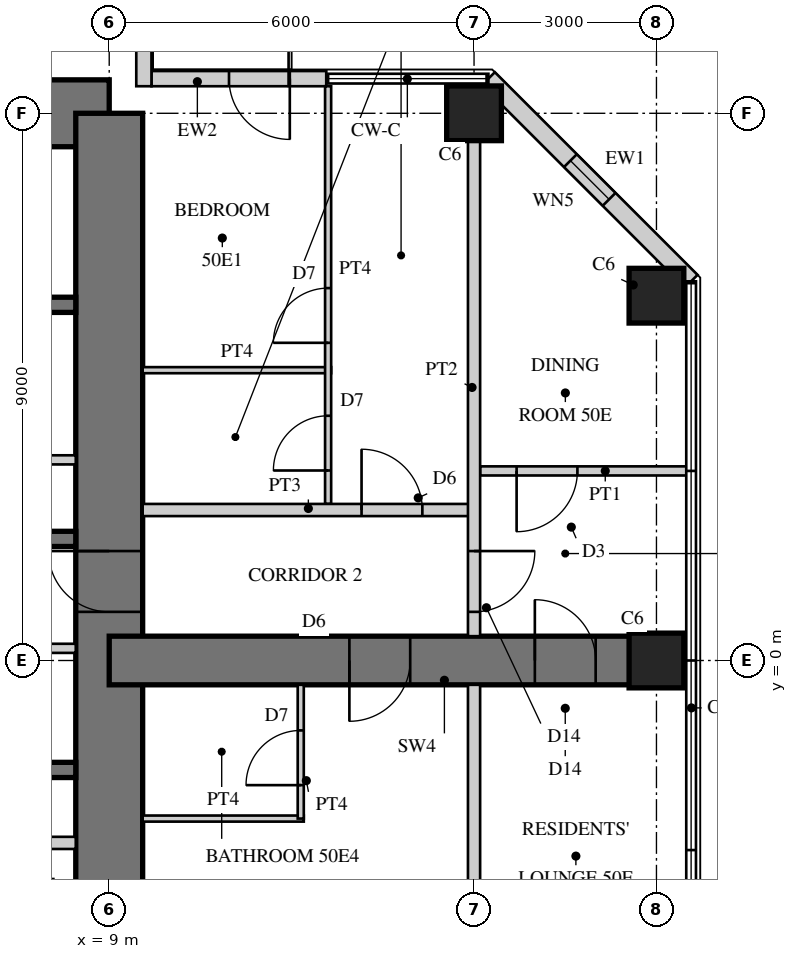
"""IFC4 building model, lengths in metres.
Left out: names, types, materials, properties, quantities, classifications, styles, units other than length and angle.
Written with IfcOpenShell. Run it as: python <this file> out.ifc"""

import sys

from ifc_helpers import new_model, si_unit, direction, frame, frame_2d, origin, origin_2d, place, context, subcontext, project, spatial, rectangle, hollow_rectangle, extrude, element, fill, save


model = new_model("IFC4")
c1 = context("Model", 3, precision=1e-05, world=origin(), true_north=direction((0.0, 1.0)))
c2 = subcontext(c1, "Body", "Model", "MODEL_VIEW")
j1 = project(units=[si_unit("LENGTHUNIT", "METRE"), si_unit("PLANEANGLEUNIT", "RADIAN")], contexts=[c1])
p1 = place(None, origin())
s1 = spatial("IfcSite", under=j1, at=p1, CompositionType="ELEMENT")
p2 = place(p1, origin())
s2 = spatial("IfcBuilding", under=s1, at=p2, CompositionType="ELEMENT")
p3 = place(p2, frame((0.0, 0.0, 200.1)))
s3 = spatial("IfcBuildingStorey", under=s2, at=p3, CompositionType="ELEMENT", Elevation=200.1)
p4 = place(p3, frame((9.0, 9.0, 0.0), z_axis=(0.0, 0.0, 1.0), x_axis=(-1.0, 0.0, 0.0)))
e1 = element("IfcWall", 1, at=p4, inside=s3, PredefinedType="SHEAR", context=c2, shape_type="SweptSolid", body=[
    extrude(rectangle(XDim=18.0, YDim=1.1, at=frame_2d((9.0, 0.0))), origin(), (0.0, 0.0, 1.0), 3.4),
])
p5 = place(p4, frame((9.8, 0.0, 0.0)))
e2 = element("IfcOpeningElement", 2, at=p5, cuts=e1, PredefinedType="OPENING", context=c2, shape_type="SweptSolid", body=[
    extrude(rectangle(XDim=1.0, YDim=2.4, at=frame_2d((0.5, 1.2))), frame((0.0, 0.56, 0.0), z_axis=(0.0, -1.0, 0.0), x_axis=(1.0, 0.0, 0.0)), (0.0, 0.0, 1.0), 1.12),
])
p6 = place(p3, frame((9.0, -9.0, 0.0), z_axis=(0.0, 0.0, 1.0), x_axis=(0.0, 1.0, 0.0)))
e3 = element("IfcWall", 3, at=p6, inside=s3, PredefinedType="SHEAR", context=c2, shape_type="SweptSolid", body=[
    extrude(rectangle(XDim=18.0, YDim=1.1, at=frame_2d((9.0, 0.0))), origin(), (0.0, 0.0, 1.0), 3.4),
])
p7 = place(p6, frame((9.8, 0.0, 0.0)))
e4 = element("IfcOpeningElement", 4, at=p7, cuts=e3, PredefinedType="OPENING", context=c2, shape_type="SweptSolid", body=[
    extrude(rectangle(XDim=1.0, YDim=2.4, at=frame_2d((0.5, 1.2))), frame((0.0, 0.56, 0.0), z_axis=(0.0, -1.0, 0.0), x_axis=(1.0, 0.0, 0.0)), (0.0, 0.0, 1.0), 1.12),
])
p8 = place(p3, frame((1.925, 2.0, 0.0), z_axis=(0.0, 0.0, 1.0), x_axis=(1.0, 0.0, 0.0)))
e5 = element("IfcWall", 5, at=p8, inside=s3, PredefinedType="SHEAR", context=c2, shape_type="SweptSolid", body=[
    extrude(rectangle(XDim=6.525, YDim=0.25, at=frame_2d((3.262, 0.0))), origin(), (0.0, 0.0, 1.0), 3.4),
])
p9 = place(p3, frame((1.925, 5.85, 0.0), z_axis=(0.0, 0.0, 1.0), x_axis=(1.0, 0.0, 0.0)))
e6 = element("IfcWall", 6, at=p9, inside=s3, PredefinedType="SHEAR", context=c2, shape_type="SweptSolid", body=[
    extrude(rectangle(XDim=6.525, YDim=0.25, at=frame_2d((3.262, 0.0))), origin(), (0.0, 0.0, 1.0), 3.4),
])
p10 = place(p9, frame((0.521, 0.0, 0.0)))
e7 = element("IfcOpeningElement", 7, at=p10, cuts=e6, PredefinedType="OPENING", context=c2, shape_type="SweptSolid", body=[
    extrude(rectangle(XDim=1.0, YDim=2.1, at=frame_2d((0.5, 1.05))), frame((0.0, 0.135, 0.0), z_axis=(0.0, -1.0, 0.0), x_axis=(1.0, 0.0, 0.0)), (0.0, 0.0, 1.0), 0.27),
])
p11 = place(p9, frame((2.762, 0.0, 0.0)))
e8 = element("IfcOpeningElement", 8, at=p11, cuts=e6, PredefinedType="OPENING", context=c2, shape_type="SweptSolid", body=[
    extrude(rectangle(XDim=1.0, YDim=2.1, at=frame_2d((0.5, 1.05))), frame((0.0, 0.135, 0.0), z_axis=(0.0, -1.0, 0.0), x_axis=(1.0, 0.0, 0.0)), (0.0, 0.0, 1.0), 0.27),
])
p12 = place(p3, frame((1.925, 3.3, 0.0), z_axis=(0.0, 0.0, 1.0), x_axis=(1.0, 0.0, 0.0)))
e9 = element("IfcWall", 9, at=p12, inside=s3, PredefinedType="PARTITIONING", context=c2, shape_type="SweptSolid", body=[
    extrude(rectangle(XDim=6.525, YDim=0.15, at=frame_2d((3.262, 0.0))), origin(), (0.0, 0.0, 1.0), 3.4),
])
p13 = place(p12, frame((0.075, 0.0, 0.0)))
e10 = element("IfcOpeningElement", 10, at=p13, cuts=e9, PredefinedType="OPENING", context=c2, shape_type="SweptSolid", body=[
    extrude(rectangle(XDim=0.8, YDim=2.1, at=frame_2d((0.4, 1.05))), frame((0.0, 0.085, 0.0), z_axis=(0.0, -1.0, 0.0), x_axis=(1.0, 0.0, 0.0)), (0.0, 0.0, 1.0), 0.17),
])
p14 = place(p12, frame((3.675, 0.0, 0.0)))
e11 = element("IfcOpeningElement", 11, at=p14, cuts=e9, PredefinedType="OPENING", context=c2, shape_type="SweptSolid", body=[
    extrude(rectangle(XDim=0.8, YDim=2.1, at=frame_2d((0.4, 1.05))), frame((0.0, 0.085, 0.0), z_axis=(0.0, -1.0, 0.0), x_axis=(1.0, 0.0, 0.0)), (0.0, 0.0, 1.0), 0.17),
])
p15 = place(p3, frame((2.125, -1.8, 0.0), z_axis=(0.0, 0.0, 1.0), x_axis=(1.0, 0.0, 0.0)))
e12 = element("IfcWall", 12, at=p15, inside=s3, PredefinedType="SHEAR", context=c2, shape_type="SweptSolid", body=[
    extrude(rectangle(XDim=6.325, YDim=0.25, at=frame_2d((3.163, 0.0))), origin(), (0.0, 0.0, 1.0), 3.4),
])
p16 = place(p3, frame((5.725, -3.0, 0.0), z_axis=(0.0, 0.0, 1.0), x_axis=(1.0, 0.0, 0.0)))
e13 = element("IfcWall", 13, at=p16, inside=s3, PredefinedType="PARTITIONING", context=c2, shape_type="SweptSolid", body=[
    extrude(rectangle(XDim=2.725, YDim=0.2, at=frame_2d((1.362, 0.0))), origin(), (0.0, 0.0, 1.0), 3.4),
])
p17 = place(p3, frame((9.0, 0.0, 0.0), z_axis=(0.0, 0.0, 1.0), x_axis=(1.0, 0.0, 0.0)))
e14 = element("IfcWall", 14, at=p17, inside=s3, PredefinedType="SHEAR", context=c2, shape_type="SweptSolid", body=[
    extrude(rectangle(XDim=9.0, YDim=0.8, at=frame_2d((4.5, 0.0))), origin(), (0.0, 0.0, 1.0), 3.4),
])
p18 = place(p17, frame((3.95, 0.0, 0.0)))
e15 = element("IfcOpeningElement", 15, at=p18, cuts=e14, PredefinedType="OPENING", context=c2, shape_type="SweptSolid", body=[
    extrude(rectangle(XDim=1.0, YDim=2.15, at=frame_2d((0.5, 1.075))), frame((0.0, 0.41, 0.0), z_axis=(0.0, -1.0, 0.0), x_axis=(1.0, 0.0, 0.0)), (0.0, 0.0, 1.0), 0.82),
])
p19 = place(p17, frame((7.0, 0.0, 0.0)))
e16 = element("IfcOpeningElement", 16, at=p19, cuts=e14, PredefinedType="OPENING", context=c2, shape_type="SweptSolid", body=[
    extrude(rectangle(XDim=1.0, YDim=2.2, at=frame_2d((0.5, 1.1))), frame((0.0, 0.41, 0.0), z_axis=(0.0, -1.0, 0.0), x_axis=(1.0, 0.0, 0.0)), (0.0, 0.0, 1.0), 0.82),
])
for number, where, z_axis, x_axis in (
    (17, (15.0, 9.0, 0.0), (0.0, 0.0, 1.0), (1.0, 0.0, 0.0)),
    (18, (18.0, 0.0, 0.0), (0.0, 0.0, 1.0), (1.0, 0.0, 0.0)),
    (19, (18.0, 6.0, 0.0), (0.0, 0.0, 1.0), (1.0, 0.0, 0.0)),
):
    element("IfcColumn", number, at=place(p3, frame(where, z_axis=z_axis, x_axis=x_axis)), inside=s3, PredefinedType="COLUMN", context=c2, shape_type="SweptSolid", body=[
        extrude(rectangle(XDim=0.9, YDim=0.9, at=origin_2d()), origin(), (0.0, 0.0, 1.0), 3.4),
    ])
p20 = place(p3, frame((18.57, 6.236, 0.0), z_axis=(0.0, 0.0, 1.0), x_axis=(-0.707106781187, 0.707106781187, 0.0)))
e20 = element("IfcWall", 20, at=p20, inside=s3, PredefinedType="SOLIDWALL", context=c2, shape_type="SweptSolid", body=[
    extrude(rectangle(XDim=4.715, YDim=0.3, at=frame_2d((2.357, 0.0))), origin(), (0.0, 0.0, 1.0), 3.22),
])
p21 = place(p20, frame((1.907, 0.0, 0.3)))
e21 = element("IfcOpeningElement", 21, at=p21, cuts=e20, PredefinedType="OPENING", context=c2, shape_type="SweptSolid", body=[
    extrude(rectangle(XDim=0.9, YDim=2.4, at=frame_2d((0.45, 1.2))), frame((0.0, 0.16, 0.0), z_axis=(0.0, -1.0, 0.0), x_axis=(1.0, 0.0, 0.0)), (0.0, 0.0, 1.0), 0.32),
])
p22 = place(p3, frame((12.57, 9.57, 0.0), z_axis=(0.0, 0.0, 1.0), x_axis=(-1.0, 0.0, 0.0)))
e22 = element("IfcWall", 22, at=p22, inside=s3, PredefinedType="SOLIDWALL", context=c2, shape_type="SweptSolid", body=[
    extrude(rectangle(XDim=2.875, YDim=0.25, at=frame_2d((1.438, 0.0))), origin(), (0.0, 0.0, 1.0), 3.22),
])
p23 = place(p22, frame((0.6, 0.0, 0.0)))
e23 = element("IfcOpeningElement", 23, at=p23, cuts=e22, PredefinedType="OPENING", context=c2, shape_type="SweptSolid", body=[
    extrude(rectangle(XDim=1.0, YDim=2.2, at=frame_2d((0.5, 1.1))), frame((0.0, 0.135, 0.0), z_axis=(0.0, -1.0, 0.0), x_axis=(1.0, 0.0, 0.0)), (0.0, 0.0, 1.0), 0.27),
])
p24 = place(p3, frame((9.57, 9.445, 0.0), z_axis=(0.0, 0.0, 1.0), x_axis=(0.0, 1.0, 0.0)))
e24 = element("IfcWall", 24, at=p24, inside=s3, PredefinedType="SOLIDWALL", context=c2, shape_type="SweptSolid", body=[
    extrude(rectangle(XDim=3.125, YDim=0.25, at=frame_2d((1.562, 0.0))), origin(), (0.0, 0.0, 1.0), 3.22),
])
p25 = place(p24, frame((0.6, 0.0, 0.0)))
e25 = element("IfcOpeningElement", 25, at=p25, cuts=e24, PredefinedType="OPENING", context=c2, shape_type="SweptSolid", body=[
    extrude(rectangle(XDim=1.0, YDim=2.2, at=frame_2d((0.5, 1.1))), frame((0.0, 0.135, 0.0), z_axis=(0.0, -1.0, 0.0), x_axis=(1.0, 0.0, 0.0)), (0.0, 0.0, 1.0), 0.27),
])
p26 = place(p3, frame((2.325, 0.2, 0.0), z_axis=(0.0, 0.0, 1.0), x_axis=(1.0, 0.0, 0.0)))
e26 = element("IfcWall", 26, at=p26, inside=s3, PredefinedType="PARTITIONING", context=c2, shape_type="SweptSolid", body=[
    extrude(rectangle(XDim=6.125, YDim=0.15, at=frame_2d((3.062, 0.0))), origin(), (0.0, 0.0, 1.0), 3.22),
])
p27 = place(p26, frame((0.4, 0.0, 0.0)))
e27 = element("IfcOpeningElement", 27, at=p27, cuts=e26, PredefinedType="OPENING", context=c2, shape_type="SweptSolid", body=[
    extrude(rectangle(XDim=1.0, YDim=2.1, at=frame_2d((0.5, 1.05))), frame((0.0, 0.085, 0.0), z_axis=(0.0, -1.0, 0.0), x_axis=(1.0, 0.0, 0.0)), (0.0, 0.0, 1.0), 0.17),
])
p28 = place(p3, frame((9.55, 4.775, 0.0), z_axis=(0.0, 0.0, 1.0), x_axis=(1.0, 0.0, 0.0)))
e28 = element("IfcWall", 28, at=p28, inside=s3, PredefinedType="PARTITIONING", context=c2, shape_type="SweptSolid", body=[
    extrude(rectangle(XDim=3.1, YDim=0.1, at=frame_2d((1.55, 0.0))), origin(), (0.0, 0.0, 1.0), 3.22),
])
p29 = place(p3, frame((12.6, 2.575, 0.0), z_axis=(0.0, 0.0, 1.0), x_axis=(0.0, 1.0, 0.0)))
e29 = element("IfcWall", 29, at=p29, inside=s3, PredefinedType="PARTITIONING", context=c2, shape_type="SweptSolid", body=[
    extrude(rectangle(XDim=6.87, YDim=0.1, at=frame_2d((3.435, 0.0))), origin(), (0.0, 0.0, 1.0), 3.22),
])
p30 = place(p29, frame((0.55, 0.0, 0.0)))
e30 = element("IfcOpeningElement", 30, at=p30, cuts=e29, PredefinedType="OPENING", context=c2, shape_type="SweptSolid", body=[
    extrude(rectangle(XDim=0.9, YDim=2.1, at=frame_2d((0.45, 1.05))), frame((0.0, 0.06, 0.0), z_axis=(0.0, -1.0, 0.0), x_axis=(1.0, 0.0, 0.0)), (0.0, 0.0, 1.0), 0.12),
])
p31 = place(p29, frame((2.65, 0.0, 0.0)))
e31 = element("IfcOpeningElement", 31, at=p31, cuts=e29, PredefinedType="OPENING", context=c2, shape_type="SweptSolid", body=[
    extrude(rectangle(XDim=0.9, YDim=2.1, at=frame_2d((0.45, 1.05))), frame((0.0, 0.06, 0.0), z_axis=(0.0, -1.0, 0.0), x_axis=(1.0, 0.0, 0.0)), (0.0, 0.0, 1.0), 0.12),
])
p32 = place(p3, frame((9.55, -2.6, 0.0), z_axis=(0.0, 0.0, 1.0), x_axis=(1.0, 0.0, 0.0)))
e32 = element("IfcWall", 32, at=p32, inside=s3, PredefinedType="PARTITIONING", context=c2, shape_type="SweptSolid", body=[
    extrude(rectangle(XDim=2.65, YDim=0.1, at=frame_2d((1.325, 0.0))), origin(), (0.0, 0.0, 1.0), 3.22),
])
p33 = place(p3, frame((12.15, -2.6, 0.0), z_axis=(0.0, 0.0, 1.0), x_axis=(0.0, 1.0, 0.0)))
e33 = element("IfcWall", 33, at=p33, inside=s3, PredefinedType="PARTITIONING", context=c2, shape_type="SweptSolid", body=[
    extrude(rectangle(XDim=2.2, YDim=0.1, at=frame_2d((1.1, 0.0))), origin(), (0.0, 0.0, 1.0), 3.22),
])
p34 = place(p33, frame((0.55, 0.0, 0.0)))
e34 = element("IfcOpeningElement", 34, at=p34, cuts=e33, PredefinedType="OPENING", context=c2, shape_type="SweptSolid", body=[
    extrude(rectangle(XDim=0.9, YDim=2.1, at=frame_2d((0.45, 1.05))), frame((0.0, 0.06, 0.0), z_axis=(0.0, -1.0, 0.0), x_axis=(1.0, 0.0, 0.0)), (0.0, 0.0, 1.0), 0.12),
])
p35 = place(p3, frame((9.55, 2.475, 0.0), z_axis=(0.0, 0.0, 1.0), x_axis=(1.0, 0.0, 0.0)))
e35 = element("IfcWall", 35, at=p35, inside=s3, PredefinedType="SOLIDWALL", context=c2, shape_type="SweptSolid", body=[
    extrude(rectangle(XDim=5.45, YDim=0.2, at=frame_2d((2.725, 0.0))), origin(), (0.0, 0.0, 1.0), 3.22),
])
p36 = place(p35, frame((3.6, 0.0, 0.0)))
e36 = element("IfcOpeningElement", 36, at=p36, cuts=e35, PredefinedType="OPENING", context=c2, shape_type="SweptSolid", body=[
    extrude(rectangle(XDim=1.0, YDim=2.15, at=frame_2d((0.5, 1.075))), frame((0.0, 0.11, 0.0), z_axis=(0.0, -1.0, 0.0), x_axis=(1.0, 0.0, 0.0)), (0.0, 0.0, 1.0), 0.22),
])
p37 = place(p3, frame((15.1, 3.118, 0.0), z_axis=(0.0, 0.0, 1.0), x_axis=(1.0, 0.0, 0.0)))
e37 = element("IfcWall", 37, at=p37, inside=s3, PredefinedType="PARTITIONING", context=c2, shape_type="SweptSolid", body=[
    extrude(rectangle(XDim=3.43, YDim=0.15, at=frame_2d((1.715, 0.0))), origin(), (0.0, 0.0, 1.0), 3.22),
])
p38 = place(p37, frame((0.6, 0.0, 0.0)))
e38 = element("IfcOpeningElement", 38, at=p38, cuts=e37, PredefinedType="OPENING", context=c2, shape_type="SweptSolid", body=[
    extrude(rectangle(XDim=1.0, YDim=2.1, at=frame_2d((0.5, 1.05))), frame((0.0, 0.085, 0.0), z_axis=(0.0, -1.0, 0.0), x_axis=(1.0, 0.0, 0.0)), (0.0, 0.0, 1.0), 0.17),
])
p39 = place(p3, frame((15.0, -8.55, 0.0), z_axis=(0.0, 0.0, 1.0), x_axis=(0.0, 1.0, 0.0)))
e39 = element("IfcWall", 39, at=p39, inside=s3, PredefinedType="SOLIDWALL", context=c2, shape_type="SweptSolid", body=[
    extrude(rectangle(XDim=8.15, YDim=0.2, at=frame_2d((4.075, 0.0))), origin(), (0.0, 0.0, 1.0), 2.47),
])
p40 = place(p3, frame((15.0, 0.4, 0.0), z_axis=(0.0, 0.0, 1.0), x_axis=(0.0, 1.0, 0.0)))
e40 = element("IfcWall", 40, at=p40, inside=s3, PredefinedType="SOLIDWALL", context=c2, shape_type="SweptSolid", body=[
    extrude(rectangle(XDim=8.15, YDim=0.2, at=frame_2d((4.075, 0.0))), origin(), (0.0, 0.0, 1.0), 2.47),
])
p41 = place(p40, frame((0.4, 0.0, 0.0)))
e41 = element("IfcOpeningElement", 41, at=p41, cuts=e40, PredefinedType="OPENING", context=c2, shape_type="SweptSolid", body=[
    extrude(rectangle(XDim=1.0, YDim=2.2, at=frame_2d((0.5, 1.1))), frame((0.0, 0.11, 0.0), z_axis=(0.0, -1.0, 0.0), x_axis=(1.0, 0.0, 0.0)), (0.0, 0.0, 1.0), 0.22),
])
p42 = place(p21, origin())
e42 = element("IfcWindow", 42, at=p42, inside=s3, PartitioningType="SINGLE_PANEL", PredefinedType="WINDOW", context=c2, shape_type="SweptSolid", body=[
    extrude(hollow_rectangle(XDim=0.9, YDim=2.4, WallThickness=0.06, at=frame_2d((0.45, 1.2))), frame((0.0, 0.03, 0.0), z_axis=(0.0, -1.0, 0.0), x_axis=(1.0, 0.0, 0.0)), (0.0, 0.0, 1.0), 0.06),
    extrude(rectangle(XDim=0.779, YDim=2.279, at=frame_2d((0.45, 1.2))), frame((0.0, 0.03, 0.0), z_axis=(0.0, -1.0, 0.0), x_axis=(1.0, 0.0, 0.0)), (0.0, 0.0, 1.0), 0.06),
])
fill(e21, e42)
p43 = place(p23, origin())
e43 = element("IfcDoor", 43, at=p43, inside=s3, OperationType="SINGLE_SWING_LEFT", PredefinedType="DOOR", context=c2, shape_type="SweptSolid", body=[
    extrude(hollow_rectangle(XDim=1.0, YDim=2.2, WallThickness=0.06, at=frame_2d((0.5, 1.1))), frame((0.0, 0.025, 0.0), z_axis=(0.0, -1.0, 0.0), x_axis=(1.0, 0.0, 0.0)), (0.0, 0.0, 1.0), 0.05),
    extrude(rectangle(XDim=0.879, YDim=2.079, at=frame_2d((0.5, 1.1))), frame((0.0, 0.025, 0.0), z_axis=(0.0, -1.0, 0.0), x_axis=(1.0, 0.0, 0.0)), (0.0, 0.0, 1.0), 0.05),
])
fill(e23, e43)
p44 = place(p30, origin())
e44 = element("IfcDoor", 44, at=p44, inside=s3, OperationType="SINGLE_SWING_LEFT", PredefinedType="DOOR", context=c2, shape_type="SweptSolid", body=[
    extrude(rectangle(XDim=0.9, YDim=2.1, at=frame_2d((0.45, 1.05))), frame((0.0, 0.025, 0.0), z_axis=(0.0, -1.0, 0.0), x_axis=(1.0, 0.0, 0.0)), (0.0, 0.0, 1.0), 0.05),
])
fill(e30, e44)
p45 = place(p31, origin())
e45 = element("IfcDoor", 45, at=p45, inside=s3, OperationType="SINGLE_SWING_LEFT", PredefinedType="DOOR", context=c2, shape_type="SweptSolid", body=[
    extrude(rectangle(XDim=0.9, YDim=2.1, at=frame_2d((0.45, 1.05))), frame((0.0, 0.025, 0.0), z_axis=(0.0, -1.0, 0.0), x_axis=(1.0, 0.0, 0.0)), (0.0, 0.0, 1.0), 0.05),
])
fill(e31, e45)
p46 = place(p34, origin())
e46 = element("IfcDoor", 46, at=p46, inside=s3, OperationType="SINGLE_SWING_LEFT", PredefinedType="DOOR", context=c2, shape_type="SweptSolid", body=[
    extrude(rectangle(XDim=0.9, YDim=2.1, at=frame_2d((0.45, 1.05))), frame((0.0, 0.025, 0.0), z_axis=(0.0, -1.0, 0.0), x_axis=(1.0, 0.0, 0.0)), (0.0, 0.0, 1.0), 0.05),
])
fill(e34, e46)
p47 = place(p36, origin())
e47 = element("IfcDoor", 47, at=p47, inside=s3, OperationType="SINGLE_SWING_LEFT", PredefinedType="DOOR", context=c2, shape_type="SweptSolid", body=[
    extrude(rectangle(XDim=1.0, YDim=2.15, at=frame_2d((0.5, 1.075))), frame((0.0, 0.025, 0.0), z_axis=(0.0, -1.0, 0.0), x_axis=(1.0, 0.0, 0.0)), (0.0, 0.0, 1.0), 0.05),
])
fill(e36, e47)
p48 = place(p38, frame((1.0, 0.0, 0.0), z_axis=(0.0, 0.0, 1.0), x_axis=(-1.0, 0.0, 0.0)))
e48 = element("IfcDoor", 48, at=p48, inside=s3, OperationType="SINGLE_SWING_RIGHT", PredefinedType="DOOR", context=c2, shape_type="SweptSolid", body=[
    extrude(rectangle(XDim=1.0, YDim=2.1, at=frame_2d((0.5, 1.05))), frame((0.0, 0.025, 0.0), z_axis=(0.0, -1.0, 0.0), x_axis=(1.0, 0.0, 0.0)), (0.0, 0.0, 1.0), 0.05),
])
fill(e38, e48)
p49 = place(p41, frame((1.0, 0.0, 0.0), z_axis=(0.0, 0.0, 1.0), x_axis=(-1.0, 0.0, 0.0)))
e49 = element("IfcDoor", 49, at=p49, inside=s3, OperationType="SINGLE_SWING_LEFT", PredefinedType="DOOR", context=c2, shape_type="SweptSolid", body=[
    extrude(rectangle(XDim=1.0, YDim=2.2, at=frame_2d((0.5, 1.1))), frame((0.0, 0.025, 0.0), z_axis=(0.0, -1.0, 0.0), x_axis=(1.0, 0.0, 0.0)), (0.0, 0.0, 1.0), 0.05),
])
fill(e41, e49)
p50 = place(p18, frame((1.0, 0.0, 0.0), z_axis=(0.0, 0.0, 1.0), x_axis=(-1.0, 0.0, 0.0)))
e50 = element("IfcDoor", 50, at=p50, inside=s3, OperationType="SINGLE_SWING_RIGHT", PredefinedType="DOOR", context=c2, shape_type="SweptSolid", body=[
    extrude(rectangle(XDim=1.0, YDim=2.15, at=frame_2d((0.5, 1.075))), frame((0.0, 0.025, 0.0), z_axis=(0.0, -1.0, 0.0), x_axis=(1.0, 0.0, 0.0)), (0.0, 0.0, 1.0), 0.05),
])
fill(e15, e50)
p51 = place(p19, origin())
e51 = element("IfcDoor", 51, at=p51, inside=s3, OperationType="SINGLE_SWING_LEFT", PredefinedType="DOOR", context=c2, shape_type="SweptSolid", body=[
    extrude(rectangle(XDim=1.0, YDim=2.2, at=frame_2d((0.5, 1.1))), frame((0.0, 0.025, 0.0), z_axis=(0.0, -1.0, 0.0), x_axis=(1.0, 0.0, 0.0)), (0.0, 0.0, 1.0), 0.05),
])
fill(e16, e51)
p52 = place(p7, origin())
e52 = element("IfcDoor", 52, at=p52, inside=s3, OperationType="SINGLE_SWING_RIGHT", PredefinedType="DOOR", context=c2, shape_type="SweptSolid", body=[
    extrude(rectangle(XDim=1.0, YDim=2.4, at=frame_2d((0.5, 1.2))), frame((0.0, 0.055, 0.0), z_axis=(0.0, -1.0, 0.0), x_axis=(1.0, 0.0, 0.0)), (0.0, 0.0, 1.0), 0.05),
])
fill(e4, e52)
save(model, sys.argv[1])
